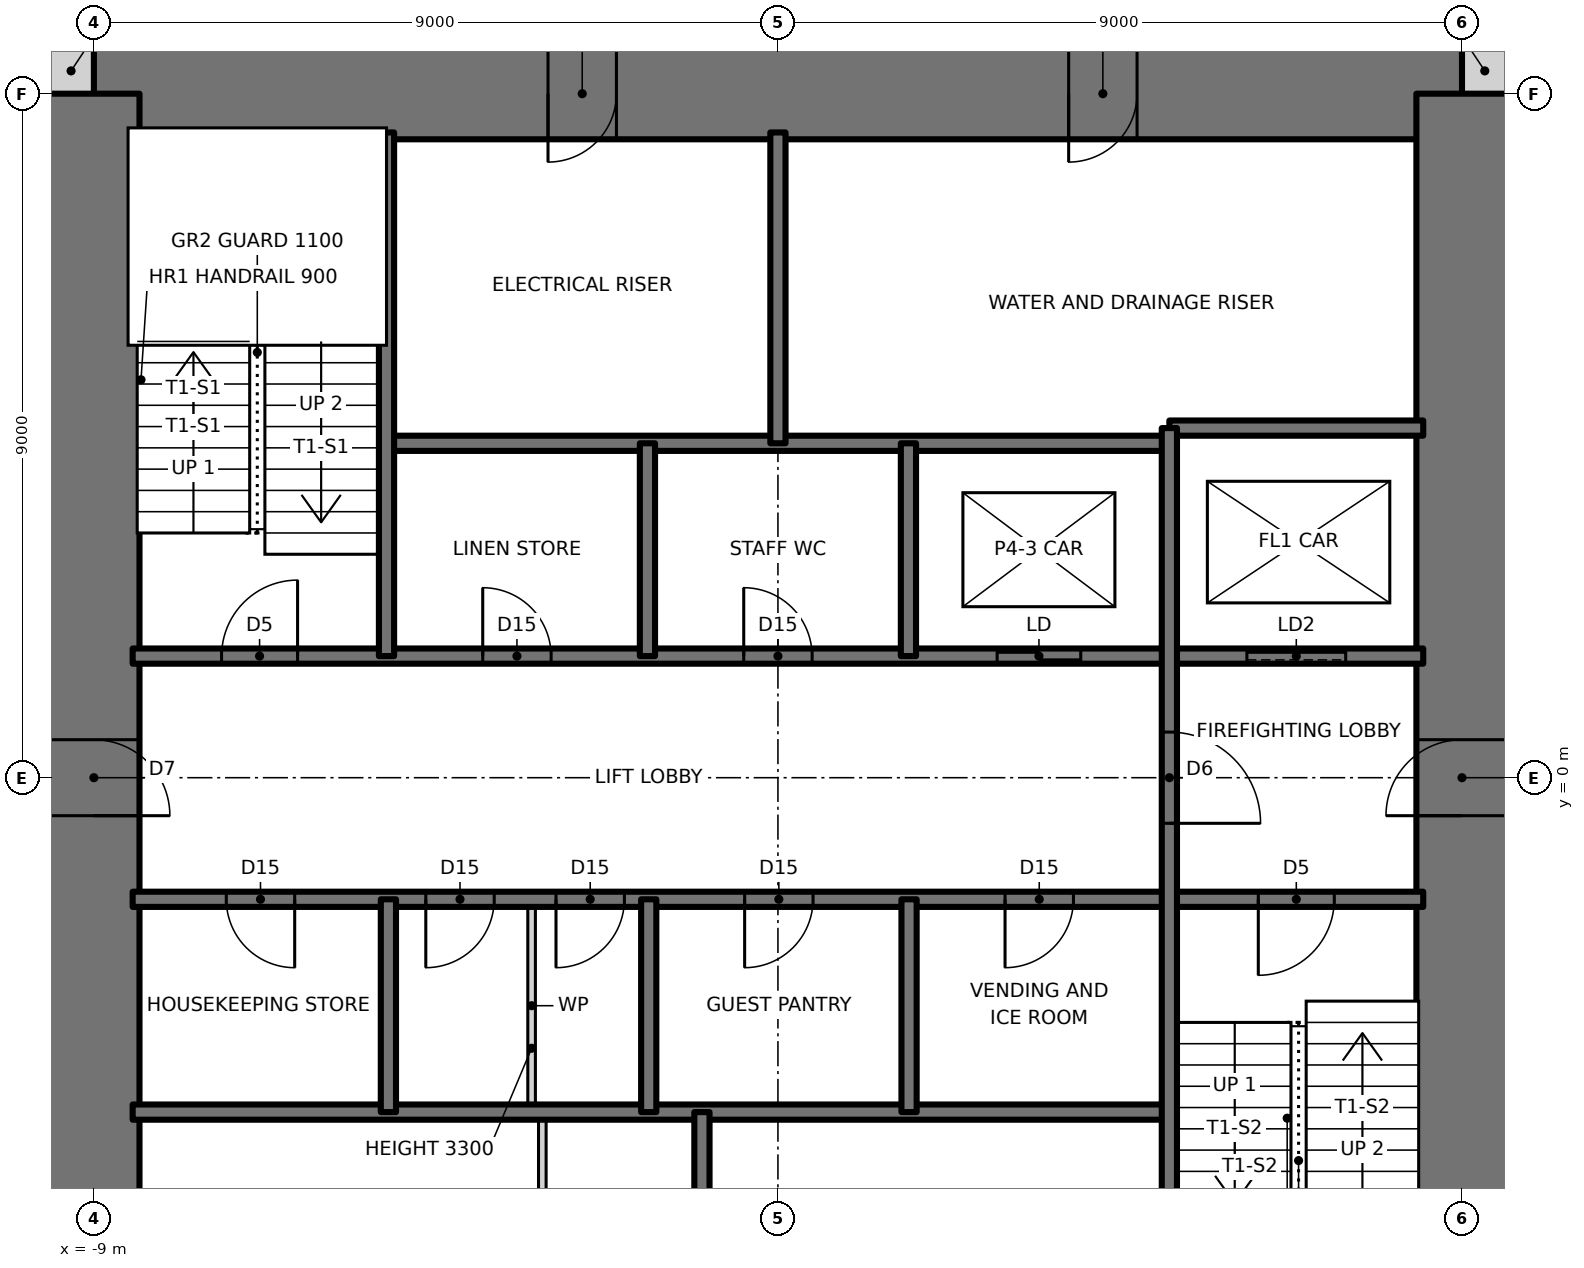
"""IFC4 building model, lengths in metres.
Left out: names, types, materials, properties, quantities, classifications, styles, units other than length and angle.
Written with IfcOpenShell. Run it as: python <this file> out.ifc"""

import sys

from ifc_helpers import new_model, si_unit, direction, frame, frame_2d, origin, place, context, subcontext, project, spatial, rectangle, extrude, element, fill, save


model = new_model("IFC4")
c1 = context("Model", 3, precision=1e-05, world=origin(), true_north=direction((0.0, 1.0)))
c2 = subcontext(c1, "Body", "Model", "MODEL_VIEW")
j1 = project(units=[si_unit("LENGTHUNIT", "METRE"), si_unit("PLANEANGLEUNIT", "RADIAN")], contexts=[c1])
p1 = place(None, origin())
s1 = spatial("IfcSite", under=j1, at=p1, CompositionType="ELEMENT")
p2 = place(p1, origin())
s2 = spatial("IfcBuilding", under=s1, at=p2, CompositionType="ELEMENT")
p3 = place(p2, frame((0.0, 0.0, 229.0)))
s3 = spatial("IfcBuildingStorey", under=s2, at=p3, CompositionType="ELEMENT", Elevation=229.0)
for number, where, z_axis, x_axis in (
    (1, (9.0, 9.3, 0.0), (0.0, 0.0, 1.0), (1.0, 0.0, 0.0)),
    (2, (-9.6, 9.3, 0.0), (0.0, 0.0, 1.0), (1.0, 0.0, 0.0)),
):
    element("IfcWall", number, at=place(p3, frame(where, z_axis=z_axis, x_axis=x_axis)), inside=s3, PredefinedType="SOLIDWALL", context=c2, shape_type="SweptSolid", body=[
        extrude(rectangle(XDim=0.6, YDim=0.6, at=frame_2d((0.3, 0.0))), origin(), (0.0, 0.0, 1.0), 3.5),
    ])
p4 = place(p3, frame((9.0, 9.0, 0.0), z_axis=(0.0, 0.0, 1.0), x_axis=(-1.0, 0.0, 0.0)))
e3 = element("IfcWall", 3, at=p4, inside=s3, PredefinedType="SHEAR", context=c2, shape_type="SweptSolid", body=[
    extrude(rectangle(XDim=18.0, YDim=1.2, at=frame_2d((9.0, 0.0))), origin(), (0.0, 0.0, 1.0), 3.5),
])
p5 = place(p4, frame((11.125, 0.0, 0.0)))
e4 = element("IfcOpeningElement", 4, at=p5, cuts=e3, PredefinedType="OPENING", context=c2, shape_type="SweptSolid", body=[
    extrude(rectangle(XDim=0.9, YDim=2.1, at=frame_2d((0.45, 1.05))), frame((0.0, 0.61, 0.0), z_axis=(0.0, -1.0, 0.0), x_axis=(1.0, 0.0, 0.0)), (0.0, 0.0, 1.0), 1.22),
])
p6 = place(p4, frame((4.275, 0.0, 0.0)))
e5 = element("IfcOpeningElement", 5, at=p6, cuts=e3, PredefinedType="OPENING", context=c2, shape_type="SweptSolid", body=[
    extrude(rectangle(XDim=0.9, YDim=2.1, at=frame_2d((0.45, 1.05))), frame((0.0, 0.61, 0.0), z_axis=(0.0, -1.0, 0.0), x_axis=(1.0, 0.0, 0.0)), (0.0, 0.0, 1.0), 1.22),
])
p7 = place(p3, frame((9.0, -9.0, 0.0), z_axis=(0.0, 0.0, 1.0), x_axis=(0.0, 1.0, 0.0)))
e6 = element("IfcWall", 6, at=p7, inside=s3, PredefinedType="SHEAR", context=c2, shape_type="SweptSolid", body=[
    extrude(rectangle(XDim=18.0, YDim=1.2, at=frame_2d((9.0, 0.0))), origin(), (0.0, 0.0, 1.0), 3.5),
])
p8 = place(p7, frame((8.5, 0.0, 0.0)))
e7 = element("IfcOpeningElement", 7, at=p8, cuts=e6, PredefinedType="OPENING", context=c2, shape_type="SweptSolid", body=[
    extrude(rectangle(XDim=1.0, YDim=2.1, at=frame_2d((0.5, 1.05))), frame((0.0, 0.61, 0.0), z_axis=(0.0, -1.0, 0.0), x_axis=(1.0, 0.0, 0.0)), (0.0, 0.0, 1.0), 1.22),
])
p9 = place(p3, frame((-9.0, 9.0, 0.0), z_axis=(0.0, 0.0, 1.0), x_axis=(0.0, -1.0, 0.0)))
e8 = element("IfcWall", 8, at=p9, inside=s3, PredefinedType="SHEAR", context=c2, shape_type="SweptSolid", body=[
    extrude(rectangle(XDim=18.0, YDim=1.2, at=frame_2d((9.0, 0.0))), origin(), (0.0, 0.0, 1.0), 3.5),
])
p10 = place(p9, frame((8.5, 0.0, 0.0)))
e9 = element("IfcOpeningElement", 9, at=p10, cuts=e8, PredefinedType="OPENING", context=c2, shape_type="SweptSolid", body=[
    extrude(rectangle(XDim=1.0, YDim=2.1, at=frame_2d((0.5, 1.05))), frame((0.0, 0.61, 0.0), z_axis=(0.0, -1.0, 0.0), x_axis=(1.0, 0.0, 0.0)), (0.0, 0.0, 1.0), 1.22),
])
p11 = place(p3, frame((-8.49, -4.4, 0.0), z_axis=(0.0, 0.0, 1.0), x_axis=(1.0, 0.0, 0.0)))
e10 = element("IfcWall", 10, at=p11, inside=s3, PredefinedType="SOLIDWALL", context=c2, shape_type="SweptSolid", body=[
    extrude(rectangle(XDim=13.64, YDim=0.2, at=frame_2d((6.82, 0.0))), origin(), (0.0, 0.0, 1.0), 3.5),
])
p12 = place(p3, frame((-8.49, -1.6, 0.0), z_axis=(0.0, 0.0, 1.0), x_axis=(1.0, 0.0, 0.0)))
e11 = element("IfcWall", 11, at=p12, inside=s3, PredefinedType="SOLIDWALL", context=c2, shape_type="SweptSolid", body=[
    extrude(rectangle(XDim=16.98, YDim=0.2, at=frame_2d((8.49, 0.0))), origin(), (0.0, 0.0, 1.0), 3.5),
])
p13 = place(p12, frame((14.81, 0.0, 0.0)))
e12 = element("IfcOpeningElement", 12, at=p13, cuts=e11, PredefinedType="OPENING", context=c2, shape_type="SweptSolid", body=[
    extrude(rectangle(XDim=1.0, YDim=2.1, at=frame_2d((0.5, 1.05))), frame((0.0, 0.11, 0.0), z_axis=(0.0, -1.0, 0.0), x_axis=(1.0, 0.0, 0.0)), (0.0, 0.0, 1.0), 0.22),
])
p14 = place(p12, frame((1.232, 0.0, 0.0)))
e13 = element("IfcOpeningElement", 13, at=p14, cuts=e11, PredefinedType="OPENING", context=c2, shape_type="SweptSolid", body=[
    extrude(rectangle(XDim=0.9, YDim=2.1, at=frame_2d((0.45, 1.05))), frame((0.0, 0.11, 0.0), z_axis=(0.0, -1.0, 0.0), x_axis=(1.0, 0.0, 0.0)), (0.0, 0.0, 1.0), 0.22),
])
p15 = place(p12, frame((5.57, 0.0, 0.0)))
e14 = element("IfcOpeningElement", 14, at=p15, cuts=e11, PredefinedType="OPENING", context=c2, shape_type="SweptSolid", body=[
    extrude(rectangle(XDim=0.9, YDim=2.1, at=frame_2d((0.45, 1.05))), frame((0.0, 0.11, 0.0), z_axis=(0.0, -1.0, 0.0), x_axis=(1.0, 0.0, 0.0)), (0.0, 0.0, 1.0), 0.22),
])
p16 = place(p12, frame((3.857, 0.0, 0.0)))
e15 = element("IfcOpeningElement", 15, at=p16, cuts=e11, PredefinedType="OPENING", context=c2, shape_type="SweptSolid", body=[
    extrude(rectangle(XDim=0.9, YDim=2.1, at=frame_2d((0.45, 1.05))), frame((0.0, 0.11, 0.0), z_axis=(0.0, -1.0, 0.0), x_axis=(1.0, 0.0, 0.0)), (0.0, 0.0, 1.0), 0.22),
])
p17 = place(p12, frame((8.052, 0.0, 0.0)))
e16 = element("IfcOpeningElement", 16, at=p17, cuts=e11, PredefinedType="OPENING", context=c2, shape_type="SweptSolid", body=[
    extrude(rectangle(XDim=0.9, YDim=2.1, at=frame_2d((0.45, 1.05))), frame((0.0, 0.11, 0.0), z_axis=(0.0, -1.0, 0.0), x_axis=(1.0, 0.0, 0.0)), (0.0, 0.0, 1.0), 0.22),
])
p18 = place(p12, frame((11.478, 0.0, 0.0)))
e17 = element("IfcOpeningElement", 17, at=p18, cuts=e11, PredefinedType="OPENING", context=c2, shape_type="SweptSolid", body=[
    extrude(rectangle(XDim=0.9, YDim=2.1, at=frame_2d((0.45, 1.05))), frame((0.0, 0.11, 0.0), z_axis=(0.0, -1.0, 0.0), x_axis=(1.0, 0.0, 0.0)), (0.0, 0.0, 1.0), 0.22),
])
p19 = place(p3, frame((-8.49, 1.6, 0.0), z_axis=(0.0, 0.0, 1.0), x_axis=(1.0, 0.0, 0.0)))
e18 = element("IfcWall", 18, at=p19, inside=s3, PredefinedType="SOLIDWALL", context=c2, shape_type="SweptSolid", body=[
    extrude(rectangle(XDim=16.98, YDim=0.2, at=frame_2d((8.49, 0.0))), origin(), (0.0, 0.0, 1.0), 3.5),
])
p20 = place(p19, frame((1.17, 0.0, 0.0)))
e19 = element("IfcOpeningElement", 19, at=p20, cuts=e18, PredefinedType="OPENING", context=c2, shape_type="SweptSolid", body=[
    extrude(rectangle(XDim=1.0, YDim=2.1, at=frame_2d((0.5, 1.05))), frame((0.0, 0.11, 0.0), z_axis=(0.0, -1.0, 0.0), x_axis=(1.0, 0.0, 0.0)), (0.0, 0.0, 1.0), 0.22),
])
p21 = place(p19, frame((4.606, 0.0, 0.0)))
e20 = element("IfcOpeningElement", 20, at=p21, cuts=e18, PredefinedType="OPENING", context=c2, shape_type="SweptSolid", body=[
    extrude(rectangle(XDim=0.9, YDim=2.1, at=frame_2d((0.45, 1.05))), frame((0.0, 0.11, 0.0), z_axis=(0.0, -1.0, 0.0), x_axis=(1.0, 0.0, 0.0)), (0.0, 0.0, 1.0), 0.22),
])
p22 = place(p19, frame((8.04, 0.0, 0.0)))
e21 = element("IfcOpeningElement", 21, at=p22, cuts=e18, PredefinedType="OPENING", context=c2, shape_type="SweptSolid", body=[
    extrude(rectangle(XDim=0.9, YDim=2.1, at=frame_2d((0.45, 1.05))), frame((0.0, 0.11, 0.0), z_axis=(0.0, -1.0, 0.0), x_axis=(1.0, 0.0, 0.0)), (0.0, 0.0, 1.0), 0.22),
])
p23 = place(p19, frame((11.374, 0.0, 0.0)))
e22 = element("IfcOpeningElement", 22, at=p23, cuts=e18, PredefinedType="OPENING", context=c2, shape_type="SweptSolid", body=[
    extrude(rectangle(XDim=1.1, YDim=2.1, at=frame_2d((0.55, 1.05))), frame((0.0, 0.11, 0.0), z_axis=(0.0, -1.0, 0.0), x_axis=(1.0, 0.0, 0.0)), (0.0, 0.0, 1.0), 0.22),
])
p24 = place(p19, frame((14.66, 0.0, 0.0)))
e23 = element("IfcOpeningElement", 23, at=p24, cuts=e18, PredefinedType="OPENING", context=c2, shape_type="SweptSolid", body=[
    extrude(rectangle(XDim=1.3, YDim=2.1, at=frame_2d((0.65, 1.05))), frame((0.0, 0.11, 0.0), z_axis=(0.0, -1.0, 0.0), x_axis=(1.0, 0.0, 0.0)), (0.0, 0.0, 1.0), 0.22),
])
p25 = place(p3, frame((-5.15, 4.4, 0.0), z_axis=(0.0, 0.0, 1.0), x_axis=(1.0, 0.0, 0.0)))
e24 = element("IfcWall", 24, at=p25, inside=s3, PredefinedType="SOLIDWALL", context=c2, shape_type="SweptSolid", body=[
    extrude(rectangle(XDim=10.3, YDim=0.2, at=frame_2d((5.15, 0.0))), origin(), (0.0, 0.0, 1.0), 3.5),
])
p26 = place(p3, frame((5.15, 4.6, 0.0), z_axis=(0.0, 0.0, 1.0), x_axis=(1.0, 0.0, 0.0)))
e25 = element("IfcWall", 25, at=p26, inside=s3, PredefinedType="SOLIDWALL", context=c2, shape_type="SweptSolid", body=[
    extrude(rectangle(XDim=3.34, YDim=0.2, at=frame_2d((1.67, 0.0))), origin(), (0.0, 0.0, 1.0), 3.5),
])
p27 = place(p3, frame((5.15, -8.49, 0.0), z_axis=(0.0, 0.0, 1.0), x_axis=(0.0, 1.0, 0.0)))
e26 = element("IfcWall", 26, at=p27, inside=s3, PredefinedType="SOLIDWALL", context=c2, shape_type="SweptSolid", body=[
    extrude(rectangle(XDim=13.09, YDim=0.2, at=frame_2d((6.545, 0.0))), origin(), (0.0, 0.0, 1.0), 3.5),
])
p28 = place(p27, frame((7.89, 0.0, 0.0)))
e27 = element("IfcOpeningElement", 27, at=p28, cuts=e26, PredefinedType="OPENING", context=c2, shape_type="SweptSolid", body=[
    extrude(rectangle(XDim=1.2, YDim=2.1, at=frame_2d((0.6, 1.05))), frame((0.0, 0.11, 0.0), z_axis=(0.0, -1.0, 0.0), x_axis=(1.0, 0.0, 0.0)), (0.0, 0.0, 1.0), 0.22),
])
for number, where, z_axis, x_axis in (
    (28, (1.725, -4.4, 0.0), (0.0, 0.0, 1.0), (0.0, 1.0, 0.0)),
    (29, (1.717, 1.6, 0.0), (0.0, 0.0, 1.0), (0.0, 1.0, 0.0)),
):
    element("IfcWall", number, at=place(p3, frame(where, z_axis=z_axis, x_axis=x_axis)), inside=s3, PredefinedType="SOLIDWALL", context=c2, shape_type="SweptSolid", body=[
        extrude(rectangle(XDim=2.8, YDim=0.2, at=frame_2d((1.4, 0.0))), origin(), (0.0, 0.0, 1.0), 3.5),
    ])
for number, where, z_axis, x_axis in (
    (30, (0.0, 4.4, 0.0), (0.0, 0.0, 1.0), (0.0, 1.0, 0.0)),
    (31, (-1.0, -8.49, 0.0), (0.0, 0.0, 1.0), (0.0, 1.0, 0.0)),
):
    element("IfcWall", number, at=place(p3, frame(where, z_axis=z_axis, x_axis=x_axis)), inside=s3, PredefinedType="SOLIDWALL", context=c2, shape_type="SweptSolid", body=[
        extrude(rectangle(XDim=4.09, YDim=0.2, at=frame_2d((2.045, 0.0))), origin(), (0.0, 0.0, 1.0), 3.5),
    ])
for number, where, z_axis, x_axis in (
    (32, (-1.7, -4.4, 0.0), (0.0, 0.0, 1.0), (0.0, 1.0, 0.0)),
    (33, (-1.717, 1.6, 0.0), (0.0, 0.0, 1.0), (0.0, 1.0, 0.0)),
):
    element("IfcWall", number, at=place(p3, frame(where, z_axis=z_axis, x_axis=x_axis)), inside=s3, PredefinedType="SOLIDWALL", context=c2, shape_type="SweptSolid", body=[
        extrude(rectangle(XDim=2.8, YDim=0.2, at=frame_2d((1.4, 0.0))), origin(), (0.0, 0.0, 1.0), 3.5),
    ])
p29 = place(p3, frame((-3.1, -8.49, 0.0), z_axis=(0.0, 0.0, 1.0), x_axis=(0.0, 1.0, 0.0)))
e34 = element("IfcWall", 34, at=p29, inside=s3, PredefinedType="PARTITIONING", context=c2, shape_type="SweptSolid", body=[
    extrude(rectangle(XDim=4.09, YDim=0.1, at=frame_2d((2.045, 0.0))), origin(), (0.0, 0.0, 1.0), 3.3),
])
p30 = place(p29, frame((1.595, 0.0, 0.0)))
e35 = element("IfcOpeningElement", 35, at=p30, cuts=e34, PredefinedType="OPENING", context=c2, shape_type="SweptSolid", body=[
    extrude(rectangle(XDim=0.9, YDim=2.1, at=frame_2d((0.45, 1.05))), frame((0.0, 0.06, 0.0), z_axis=(0.0, -1.0, 0.0), x_axis=(1.0, 0.0, 0.0)), (0.0, 0.0, 1.0), 0.12),
])
p31 = place(p3, frame((-3.241, -4.4, 0.0), z_axis=(0.0, 0.0, 1.0), x_axis=(0.0, 1.0, 0.0)))
e36 = element("IfcWall", 36, at=p31, inside=s3, PredefinedType="PARTITIONING", context=c2, shape_type="SweptSolid", body=[
    extrude(rectangle(XDim=2.8, YDim=0.1, at=frame_2d((1.4, 0.0))), origin(), (0.0, 0.0, 1.0), 3.3),
])
p32 = place(p3, frame((-5.125, -4.4, 0.0), z_axis=(0.0, 0.0, 1.0), x_axis=(0.0, 1.0, 0.0)))
e37 = element("IfcWall", 37, at=p32, inside=s3, PredefinedType="SOLIDWALL", context=c2, shape_type="SweptSolid", body=[
    extrude(rectangle(XDim=2.8, YDim=0.2, at=frame_2d((1.4, 0.0))), origin(), (0.0, 0.0, 1.0), 3.5),
])
p33 = place(p3, frame((-5.15, 1.6, 0.0), z_axis=(0.0, 0.0, 1.0), x_axis=(0.0, 1.0, 0.0)))
e38 = element("IfcWall", 38, at=p33, inside=s3, PredefinedType="SOLIDWALL", context=c2, shape_type="SweptSolid", body=[
    extrude(rectangle(XDim=6.89, YDim=0.2, at=frame_2d((3.445, 0.0))), origin(), (0.0, 0.0, 1.0), 3.5),
])
p34 = place(p20, origin())
e39 = element("IfcDoor", 39, at=p34, inside=s3, OperationType="SINGLE_SWING_RIGHT", PredefinedType="DOOR", context=c2, shape_type="SweptSolid", body=[
    extrude(rectangle(XDim=1.0, YDim=2.1, at=frame_2d((0.5, 1.05))), frame((0.0, 0.025, 0.0), z_axis=(0.0, -1.0, 0.0), x_axis=(1.0, 0.0, 0.0)), (0.0, 0.0, 1.0), 0.05),
])
fill(e19, e39)
p35 = place(p13, frame((1.0, 0.0, 0.0), z_axis=(0.0, 0.0, 1.0), x_axis=(-1.0, 0.0, 0.0)))
e40 = element("IfcDoor", 40, at=p35, inside=s3, OperationType="SINGLE_SWING_RIGHT", PredefinedType="DOOR", context=c2, shape_type="SweptSolid", body=[
    extrude(rectangle(XDim=1.0, YDim=2.1, at=frame_2d((0.5, 1.05))), frame((0.0, 0.025, 0.0), z_axis=(0.0, -1.0, 0.0), x_axis=(1.0, 0.0, 0.0)), (0.0, 0.0, 1.0), 0.05),
])
fill(e12, e40)
p36 = place(p28, frame((1.2, 0.0, 0.0), z_axis=(0.0, 0.0, 1.0), x_axis=(-1.0, 0.0, 0.0)))
e41 = element("IfcDoor", 41, at=p36, inside=s3, OperationType="SINGLE_SWING_RIGHT", PredefinedType="DOOR", context=c2, shape_type="SweptSolid", body=[
    extrude(rectangle(XDim=1.2, YDim=2.1, at=frame_2d((0.6, 1.05))), frame((0.0, 0.025, 0.0), z_axis=(0.0, -1.0, 0.0), x_axis=(1.0, 0.0, 0.0)), (0.0, 0.0, 1.0), 0.05),
])
fill(e27, e41)
p37 = place(p21, origin())
e42 = element("IfcDoor", 42, at=p37, inside=s3, OperationType="SINGLE_SWING_LEFT", PredefinedType="DOOR", context=c2, shape_type="SweptSolid", body=[
    extrude(rectangle(XDim=0.9, YDim=2.1, at=frame_2d((0.45, 1.05))), frame((0.0, 0.025, 0.0), z_axis=(0.0, -1.0, 0.0), x_axis=(1.0, 0.0, 0.0)), (0.0, 0.0, 1.0), 0.05),
])
fill(e20, e42)
p38 = place(p22, origin())
e43 = element("IfcDoor", 43, at=p38, inside=s3, OperationType="SINGLE_SWING_LEFT", PredefinedType="DOOR", context=c2, shape_type="SweptSolid", body=[
    extrude(rectangle(XDim=0.9, YDim=2.1, at=frame_2d((0.45, 1.05))), frame((0.0, 0.025, 0.0), z_axis=(0.0, -1.0, 0.0), x_axis=(1.0, 0.0, 0.0)), (0.0, 0.0, 1.0), 0.05),
])
fill(e21, e43)
p39 = place(p14, frame((0.9, 0.0, 0.0), z_axis=(0.0, 0.0, 1.0), x_axis=(-1.0, 0.0, 0.0)))
e44 = element("IfcDoor", 44, at=p39, inside=s3, OperationType="SINGLE_SWING_LEFT", PredefinedType="DOOR", context=c2, shape_type="SweptSolid", body=[
    extrude(rectangle(XDim=0.9, YDim=2.1, at=frame_2d((0.45, 1.05))), frame((0.0, 0.025, 0.0), z_axis=(0.0, -1.0, 0.0), x_axis=(1.0, 0.0, 0.0)), (0.0, 0.0, 1.0), 0.05),
])
fill(e13, e44)
p40 = place(p15, frame((0.9, 0.0, 0.0), z_axis=(0.0, 0.0, 1.0), x_axis=(-1.0, 0.0, 0.0)))
e45 = element("IfcDoor", 45, at=p40, inside=s3, OperationType="SINGLE_SWING_RIGHT", PredefinedType="DOOR", context=c2, shape_type="SweptSolid", body=[
    extrude(rectangle(XDim=0.9, YDim=2.1, at=frame_2d((0.45, 1.05))), frame((0.0, 0.025, 0.0), z_axis=(0.0, -1.0, 0.0), x_axis=(1.0, 0.0, 0.0)), (0.0, 0.0, 1.0), 0.05),
])
fill(e14, e45)
p41 = place(p16, frame((0.9, 0.0, 0.0), z_axis=(0.0, 0.0, 1.0), x_axis=(-1.0, 0.0, 0.0)))
e46 = element("IfcDoor", 46, at=p41, inside=s3, OperationType="SINGLE_SWING_RIGHT", PredefinedType="DOOR", context=c2, shape_type="SweptSolid", body=[
    extrude(rectangle(XDim=0.9, YDim=2.1, at=frame_2d((0.45, 1.05))), frame((0.0, 0.025, 0.0), z_axis=(0.0, -1.0, 0.0), x_axis=(1.0, 0.0, 0.0)), (0.0, 0.0, 1.0), 0.05),
])
fill(e15, e46)
p42 = place(p17, frame((0.9, 0.0, 0.0), z_axis=(0.0, 0.0, 1.0), x_axis=(-1.0, 0.0, 0.0)))
e47 = element("IfcDoor", 47, at=p42, inside=s3, OperationType="SINGLE_SWING_RIGHT", PredefinedType="DOOR", context=c2, shape_type="SweptSolid", body=[
    extrude(rectangle(XDim=0.9, YDim=2.1, at=frame_2d((0.45, 1.05))), frame((0.0, 0.025, 0.0), z_axis=(0.0, -1.0, 0.0), x_axis=(1.0, 0.0, 0.0)), (0.0, 0.0, 1.0), 0.05),
])
fill(e16, e47)
p43 = place(p18, frame((0.9, 0.0, 0.0), z_axis=(0.0, 0.0, 1.0), x_axis=(-1.0, 0.0, 0.0)))
e48 = element("IfcDoor", 48, at=p43, inside=s3, OperationType="SINGLE_SWING_RIGHT", PredefinedType="DOOR", context=c2, shape_type="SweptSolid", body=[
    extrude(rectangle(XDim=0.9, YDim=2.1, at=frame_2d((0.45, 1.05))), frame((0.0, 0.025, 0.0), z_axis=(0.0, -1.0, 0.0), x_axis=(1.0, 0.0, 0.0)), (0.0, 0.0, 1.0), 0.05),
])
fill(e17, e48)
p44 = place(p10, origin())
e49 = element("IfcDoor", 49, at=p44, inside=s3, OperationType="SINGLE_SWING_RIGHT", PredefinedType="DOOR", context=c2, shape_type="SweptSolid", body=[
    extrude(rectangle(XDim=1.0, YDim=2.1, at=frame_2d((0.5, 1.05))), frame((0.0, 0.025, 0.0), z_axis=(0.0, -1.0, 0.0), x_axis=(1.0, 0.0, 0.0)), (0.0, 0.0, 1.0), 0.05),
])
fill(e9, e49)
p45 = place(p8, origin())
e50 = element("IfcDoor", 50, at=p45, inside=s3, OperationType="SINGLE_SWING_LEFT", PredefinedType="DOOR", context=c2, shape_type="SweptSolid", body=[
    extrude(rectangle(XDim=1.0, YDim=2.1, at=frame_2d((0.5, 1.05))), frame((0.0, 0.025, 0.0), z_axis=(0.0, -1.0, 0.0), x_axis=(1.0, 0.0, 0.0)), (0.0, 0.0, 1.0), 0.05),
])
fill(e7, e50)
p46 = place(p5, origin())
e51 = element("IfcDoor", 51, at=p46, inside=s3, OperationType="SINGLE_SWING_RIGHT", PredefinedType="DOOR", context=c2, shape_type="SweptSolid", body=[
    extrude(rectangle(XDim=0.9, YDim=2.1, at=frame_2d((0.45, 1.05))), frame((0.0, 0.025, 0.0), z_axis=(0.0, -1.0, 0.0), x_axis=(1.0, 0.0, 0.0)), (0.0, 0.0, 1.0), 0.05),
])
fill(e4, e51)
p47 = place(p6, origin())
e52 = element("IfcDoor", 52, at=p47, inside=s3, OperationType="SINGLE_SWING_RIGHT", PredefinedType="DOOR", context=c2, shape_type="SweptSolid", body=[
    extrude(rectangle(XDim=0.9, YDim=2.1, at=frame_2d((0.45, 1.05))), frame((0.0, 0.025, 0.0), z_axis=(0.0, -1.0, 0.0), x_axis=(1.0, 0.0, 0.0)), (0.0, 0.0, 1.0), 0.05),
])
fill(e5, e52)
p48 = place(p23, origin())
e53 = element("IfcDoor", 53, at=p48, inside=s3, OperationType="DOUBLE_DOOR_SLIDING", PredefinedType="DOOR", context=c2, shape_type="SweptSolid", body=[
    extrude(rectangle(XDim=1.1, YDim=2.1, at=frame_2d((0.55, 1.05))), frame((0.0, 0.025, 0.0), z_axis=(0.0, -1.0, 0.0), x_axis=(1.0, 0.0, 0.0)), (0.0, 0.0, 1.0), 0.05),
])
fill(e22, e53)
p49 = place(p24, origin())
e54 = element("IfcDoor", 54, at=p49, inside=s3, OperationType="SLIDING_TO_LEFT", PredefinedType="DOOR", context=c2, shape_type="SweptSolid", body=[
    extrude(rectangle(XDim=1.3, YDim=2.1, at=frame_2d((0.65, 1.05))), frame((0.0, 0.025, 0.0), z_axis=(0.0, -1.0, 0.0), x_axis=(1.0, 0.0, 0.0)), (0.0, 0.0, 1.0), 0.05),
])
fill(e23, e54)
save(model, sys.argv[1])
